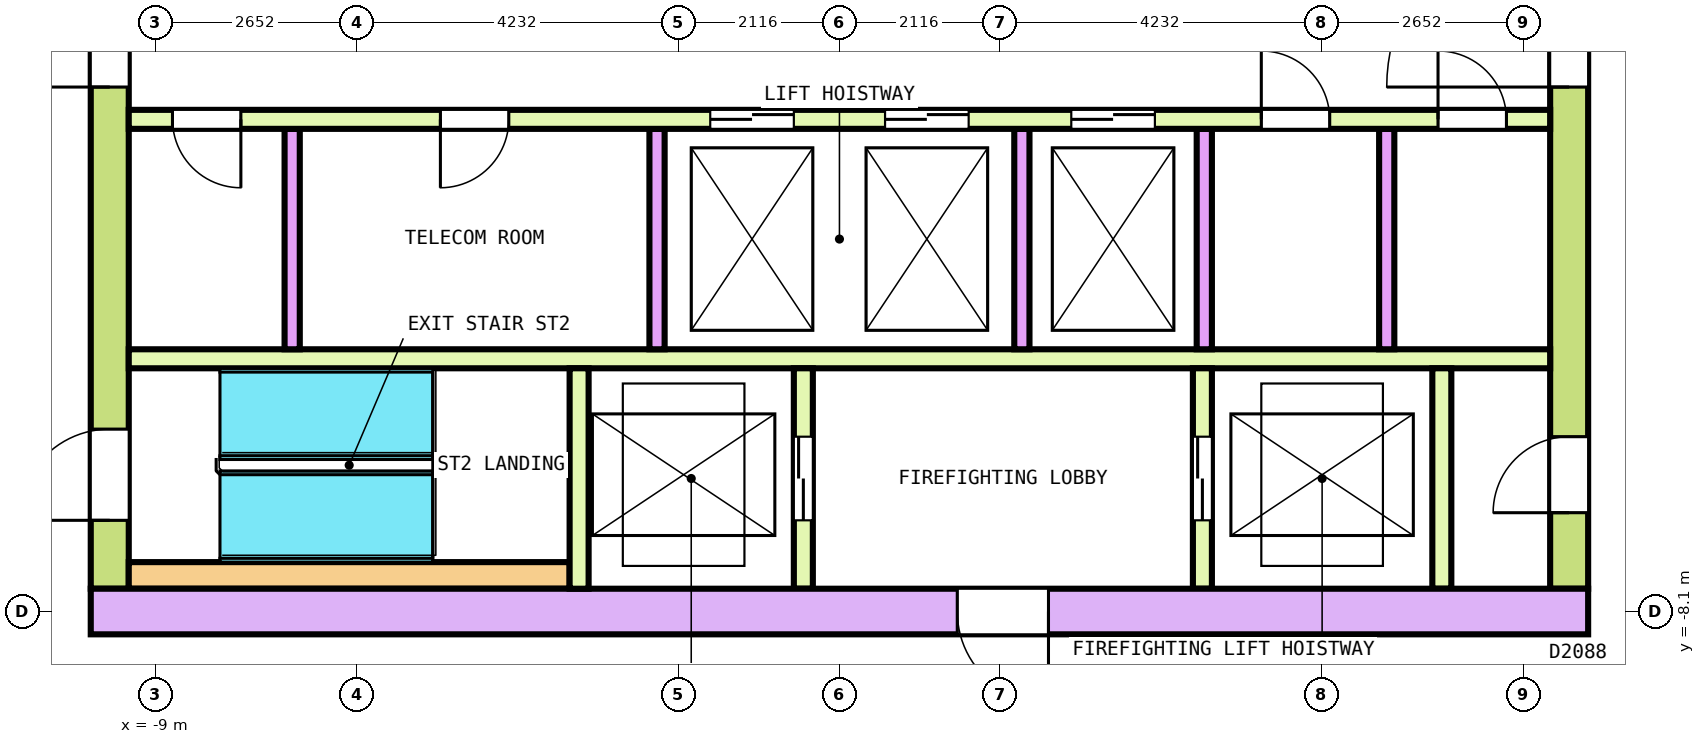
"""IFC4 building model, lengths in metres.
Left out: names, types, materials, properties, quantities, classifications, styles, units other than length and angle.
Written with IfcOpenShell. Run it as: python <this file> out.ifc"""

import sys

from ifc_helpers import new_model, si_unit, direction, frame, frame_2d, origin, place, context, subcontext, project, spatial, rectangle, extrude, element, fill, save


model = new_model("IFC4")
c1 = context("Model", 3, precision=1e-05, world=origin(), true_north=direction((0.0, 1.0)))
c2 = subcontext(c1, "Body", "Model", "MODEL_VIEW")
j1 = project(units=[si_unit("LENGTHUNIT", "METRE"), si_unit("PLANEANGLEUNIT", "RADIAN")], contexts=[c1])
p1 = place(None, origin())
s1 = spatial("IfcSite", under=j1, at=p1, CompositionType="ELEMENT")
p2 = place(p1, origin())
s2 = spatial("IfcBuilding", under=s1, at=p2, CompositionType="ELEMENT")
p3 = place(p2, frame((0.0, 0.0, 253.4)))
s3 = spatial("IfcBuildingStorey", under=s2, at=p3, CompositionType="ELEMENT", Elevation=253.4)
p4 = place(p3, frame((-9.85, -8.1, 0.0), z_axis=(0.0, 0.0, 1.0), x_axis=(1.0, 0.0, 0.0)))
e1 = element("IfcWall", 1, at=p4, inside=s3, PredefinedType="SHEAR", context=c2, shape_type="SweptSolid", body=[
    extrude(rectangle(XDim=19.7, YDim=0.6, at=frame_2d((9.85, 0.0))), origin(), (0.0, 0.0, 1.0), 3.7),
])
p5 = place(p4, frame((11.4, 0.0, 0.0)))
e2 = element("IfcOpeningElement", 2, at=p5, cuts=e1, PredefinedType="OPENING", context=c2, shape_type="SweptSolid", body=[
    extrude(rectangle(XDim=1.2, YDim=2.1, at=frame_2d((0.6, 1.05))), frame((0.0, 0.31, 0.0), z_axis=(0.0, -1.0, 0.0), x_axis=(1.0, 0.0, 0.0)), (0.0, 0.0, 1.0), 0.62),
])
p6 = place(p3, frame((-9.6, -7.8, 0.0), z_axis=(0.0, 0.0, 1.0), x_axis=(0.0, 1.0, 0.0)))
e3 = element("IfcWall", 3, at=p6, inside=s3, PredefinedType="SHEAR", context=c2, shape_type="SweptSolid", body=[
    extrude(rectangle(XDim=15.6, YDim=0.5, at=frame_2d((7.8, 0.0))), origin(), (0.0, 0.0, 1.0), 3.7),
])
p7 = place(p6, frame((6.6, 0.0, 0.0)))
e4 = element("IfcOpeningElement", 4, at=p7, cuts=e3, PredefinedType="OPENING", context=c2, shape_type="SweptSolid", body=[
    extrude(rectangle(XDim=2.4, YDim=2.1, at=frame_2d((1.2, 1.05))), frame((0.0, 0.26, 0.0), z_axis=(0.0, -1.0, 0.0), x_axis=(1.0, 0.0, 0.0)), (0.0, 0.0, 1.0), 0.52),
])
p8 = place(p6, frame((13.5, 0.0, 0.0)))
e5 = element("IfcOpeningElement", 5, at=p8, cuts=e3, PredefinedType="OPENING", context=c2, shape_type="SweptSolid", body=[
    extrude(rectangle(XDim=1.2, YDim=2.1, at=frame_2d((0.6, 1.05))), frame((0.0, 0.26, 0.0), z_axis=(0.0, -1.0, 0.0), x_axis=(1.0, 0.0, 0.0)), (0.0, 0.0, 1.0), 0.52),
])
p9 = place(p6, frame((0.9, 0.0, 0.0)))
e6 = element("IfcOpeningElement", 6, at=p9, cuts=e3, PredefinedType="OPENING", context=c2, shape_type="SweptSolid", body=[
    extrude(rectangle(XDim=1.2, YDim=2.1, at=frame_2d((0.6, 1.05))), frame((0.0, 0.26, 0.0), z_axis=(0.0, -1.0, 0.0), x_axis=(1.0, 0.0, 0.0)), (0.0, 0.0, 1.0), 0.52),
])
p10 = place(p3, frame((9.6, -7.8, 0.0), z_axis=(0.0, 0.0, 1.0), x_axis=(0.0, 1.0, 0.0)))
e7 = element("IfcWall", 7, at=p10, inside=s3, PredefinedType="SHEAR", context=c2, shape_type="SweptSolid", body=[
    extrude(rectangle(XDim=15.6, YDim=0.5, at=frame_2d((7.8, 0.0))), origin(), (0.0, 0.0, 1.0), 3.7),
])
p11 = place(p10, frame((6.6, 0.0, 0.0)))
e8 = element("IfcOpeningElement", 8, at=p11, cuts=e7, PredefinedType="OPENING", context=c2, shape_type="SweptSolid", body=[
    extrude(rectangle(XDim=2.4, YDim=2.1, at=frame_2d((1.2, 1.05))), frame((0.0, 0.26, 0.0), z_axis=(0.0, -1.0, 0.0), x_axis=(1.0, 0.0, 0.0)), (0.0, 0.0, 1.0), 0.52),
])
p12 = place(p10, frame((13.5, 0.0, 0.0)))
e9 = element("IfcOpeningElement", 9, at=p12, cuts=e7, PredefinedType="OPENING", context=c2, shape_type="SweptSolid", body=[
    extrude(rectangle(XDim=1.2, YDim=2.1, at=frame_2d((0.6, 1.05))), frame((0.0, 0.26, 0.0), z_axis=(0.0, -1.0, 0.0), x_axis=(1.0, 0.0, 0.0)), (0.0, 0.0, 1.0), 0.52),
])
p13 = place(p10, frame((1.0, 0.0, 0.0)))
e10 = element("IfcOpeningElement", 10, at=p13, cuts=e7, PredefinedType="OPENING", context=c2, shape_type="SweptSolid", body=[
    extrude(rectangle(XDim=1.0, YDim=2.1, at=frame_2d((0.5, 1.05))), frame((0.0, 0.26, 0.0), z_axis=(0.0, -1.0, 0.0), x_axis=(1.0, 0.0, 0.0)), (0.0, 0.0, 1.0), 0.52),
])
p14 = place(p3, frame((-9.35, -1.625, 0.0), z_axis=(0.0, 0.0, 1.0), x_axis=(1.0, 0.0, 0.0)))
e11 = element("IfcWall", 11, at=p14, inside=s3, PredefinedType="SOLIDWALL", context=c2, shape_type="SweptSolid", body=[
    extrude(rectangle(XDim=18.7, YDim=0.25, at=frame_2d((9.35, 0.0))), origin(), (0.0, 0.0, 1.0), 3.7),
])
p15 = place(p14, frame((7.65, 0.0, 0.0)))
e12 = element("IfcOpeningElement", 12, at=p15, cuts=e11, PredefinedType="OPENING", context=c2, shape_type="SweptSolid", body=[
    extrude(rectangle(XDim=1.1, YDim=2.1, at=frame_2d((0.55, 1.05))), frame((0.0, 0.135, 0.0), z_axis=(0.0, -1.0, 0.0), x_axis=(1.0, 0.0, 0.0)), (0.0, 0.0, 1.0), 0.27),
])
p16 = place(p14, frame((9.95, 0.0, 0.0)))
e13 = element("IfcOpeningElement", 13, at=p16, cuts=e11, PredefinedType="OPENING", context=c2, shape_type="SweptSolid", body=[
    extrude(rectangle(XDim=1.1, YDim=2.1, at=frame_2d((0.55, 1.05))), frame((0.0, 0.135, 0.0), z_axis=(0.0, -1.0, 0.0), x_axis=(1.0, 0.0, 0.0)), (0.0, 0.0, 1.0), 0.27),
])
p17 = place(p14, frame((12.4, 0.0, 0.0)))
e14 = element("IfcOpeningElement", 14, at=p17, cuts=e11, PredefinedType="OPENING", context=c2, shape_type="SweptSolid", body=[
    extrude(rectangle(XDim=1.1, YDim=2.1, at=frame_2d((0.55, 1.05))), frame((0.0, 0.135, 0.0), z_axis=(0.0, -1.0, 0.0), x_axis=(1.0, 0.0, 0.0)), (0.0, 0.0, 1.0), 0.27),
])
p18 = place(p14, frame((0.575, 0.0, 0.0)))
e15 = element("IfcOpeningElement", 15, at=p18, cuts=e11, PredefinedType="OPENING", context=c2, shape_type="SweptSolid", body=[
    extrude(rectangle(XDim=0.9, YDim=2.1, at=frame_2d((0.45, 1.05))), frame((0.0, 0.135, 0.0), z_axis=(0.0, -1.0, 0.0), x_axis=(1.0, 0.0, 0.0)), (0.0, 0.0, 1.0), 0.27),
])
p19 = place(p14, frame((4.1, 0.0, 0.0)))
e16 = element("IfcOpeningElement", 16, at=p19, cuts=e11, PredefinedType="OPENING", context=c2, shape_type="SweptSolid", body=[
    extrude(rectangle(XDim=0.9, YDim=2.1, at=frame_2d((0.45, 1.05))), frame((0.0, 0.135, 0.0), z_axis=(0.0, -1.0, 0.0), x_axis=(1.0, 0.0, 0.0)), (0.0, 0.0, 1.0), 0.27),
])
p20 = place(p14, frame((14.9, 0.0, 0.0)))
e17 = element("IfcOpeningElement", 17, at=p20, cuts=e11, PredefinedType="OPENING", context=c2, shape_type="SweptSolid", body=[
    extrude(rectangle(XDim=0.9, YDim=2.1, at=frame_2d((0.45, 1.05))), frame((0.0, 0.135, 0.0), z_axis=(0.0, -1.0, 0.0), x_axis=(1.0, 0.0, 0.0)), (0.0, 0.0, 1.0), 0.27),
])
p21 = place(p14, frame((17.225, 0.0, 0.0)))
e18 = element("IfcOpeningElement", 18, at=p21, cuts=e11, PredefinedType="OPENING", context=c2, shape_type="SweptSolid", body=[
    extrude(rectangle(XDim=0.9, YDim=2.1, at=frame_2d((0.45, 1.05))), frame((0.0, 0.135, 0.0), z_axis=(0.0, -1.0, 0.0), x_axis=(1.0, 0.0, 0.0)), (0.0, 0.0, 1.0), 0.27),
])
p22 = place(p3, frame((-9.35, -4.775, 0.0), z_axis=(0.0, 0.0, 1.0), x_axis=(1.0, 0.0, 0.0)))
e19 = element("IfcWall", 19, at=p22, inside=s3, PredefinedType="SOLIDWALL", context=c2, shape_type="SweptSolid", body=[
    extrude(rectangle(XDim=18.7, YDim=0.25, at=frame_2d((9.35, 0.0))), origin(), (0.0, 0.0, 1.0), 3.7),
])
for number, where, z_axis, x_axis in (
    (20, (-7.2, -4.65, 0.0), (0.0, 0.0, 1.0), (0.0, 1.0, 0.0)),
    (21, (-2.4, -4.65, 0.0), (0.0, 0.0, 1.0), (0.0, 1.0, 0.0)),
    (22, (2.4, -4.65, 0.0), (0.0, 0.0, 1.0), (0.0, 1.0, 0.0)),
    (23, (4.8, -4.65, 0.0), (0.0, 0.0, 1.0), (0.0, 1.0, 0.0)),
    (24, (7.2, -4.65, 0.0), (0.0, 0.0, 1.0), (0.0, 1.0, 0.0)),
):
    element("IfcWall", number, at=place(p3, frame(where, z_axis=z_axis, x_axis=x_axis)), inside=s3, PredefinedType="SOLIDWALL", context=c2, shape_type="SweptSolid", body=[
        extrude(rectangle(XDim=2.9, YDim=0.2, at=frame_2d((1.45, 0.0))), origin(), (0.0, 0.0, 1.0), 3.7),
    ])
p23 = place(p3, frame((-9.35, -7.625, 0.0), z_axis=(0.0, 0.0, 1.0), x_axis=(1.0, 0.0, 0.0)))
e25 = element("IfcWall", 25, at=p23, inside=s3, PredefinedType="SOLIDWALL", context=c2, shape_type="SweptSolid", body=[
    extrude(rectangle(XDim=5.8, YDim=0.35, at=frame_2d((2.9, 0.0))), origin(), (0.0, 0.0, 1.0), 3.7),
])
p24 = place(p3, frame((-3.425, -7.8, 0.0), z_axis=(0.0, 0.0, 1.0), x_axis=(0.0, 1.0, 0.0)))
e26 = element("IfcWall", 26, at=p24, inside=s3, PredefinedType="SOLIDWALL", context=c2, shape_type="SweptSolid", body=[
    extrude(rectangle(XDim=2.9, YDim=0.25, at=frame_2d((1.45, 0.0))), origin(), (0.0, 0.0, 1.0), 3.7),
])
p25 = place(p3, frame((-0.475, -7.8, 0.0), z_axis=(0.0, 0.0, 1.0), x_axis=(0.0, 1.0, 0.0)))
e27 = element("IfcWall", 27, at=p25, inside=s3, PredefinedType="SOLIDWALL", context=c2, shape_type="SweptSolid", body=[
    extrude(rectangle(XDim=2.9, YDim=0.25, at=frame_2d((1.45, 0.0))), origin(), (0.0, 0.0, 1.0), 3.7),
])
p26 = place(p25, frame((0.9, 0.0, 0.0)))
e28 = element("IfcOpeningElement", 28, at=p26, cuts=e27, PredefinedType="OPENING", context=c2, shape_type="SweptSolid", body=[
    extrude(rectangle(XDim=1.1, YDim=2.1, at=frame_2d((0.55, 1.05))), frame((0.0, 0.135, 0.0), z_axis=(0.0, -1.0, 0.0), x_axis=(1.0, 0.0, 0.0)), (0.0, 0.0, 1.0), 0.27),
])
p27 = place(p3, frame((4.775, -7.8, 0.0), z_axis=(0.0, 0.0, 1.0), x_axis=(0.0, 1.0, 0.0)))
e29 = element("IfcWall", 29, at=p27, inside=s3, PredefinedType="SOLIDWALL", context=c2, shape_type="SweptSolid", body=[
    extrude(rectangle(XDim=2.9, YDim=0.25, at=frame_2d((1.45, 0.0))), origin(), (0.0, 0.0, 1.0), 3.7),
])
p28 = place(p27, frame((0.9, 0.0, 0.0)))
e30 = element("IfcOpeningElement", 30, at=p28, cuts=e29, PredefinedType="OPENING", context=c2, shape_type="SweptSolid", body=[
    extrude(rectangle(XDim=1.1, YDim=2.1, at=frame_2d((0.55, 1.05))), frame((0.0, 0.135, 0.0), z_axis=(0.0, -1.0, 0.0), x_axis=(1.0, 0.0, 0.0)), (0.0, 0.0, 1.0), 0.27),
])
p29 = place(p3, frame((7.925, -7.8, 0.0), z_axis=(0.0, 0.0, 1.0), x_axis=(0.0, 1.0, 0.0)))
e31 = element("IfcWall", 31, at=p29, inside=s3, PredefinedType="SOLIDWALL", context=c2, shape_type="SweptSolid", body=[
    extrude(rectangle(XDim=2.9, YDim=0.25, at=frame_2d((1.45, 0.0))), origin(), (0.0, 0.0, 1.0), 3.7),
])
p30 = place(p15, origin())
e32 = element("IfcDoor", 32, at=p30, inside=s3, OperationType="DOUBLE_DOOR_SLIDING", PredefinedType="DOOR", context=c2, shape_type="SweptSolid", body=[
    extrude(rectangle(XDim=1.1, YDim=2.1, at=frame_2d((0.55, 1.05))), frame((0.0, 0.075, 0.0), z_axis=(0.0, -1.0, 0.0), x_axis=(1.0, 0.0, 0.0)), (0.0, 0.0, 1.0), 0.15),
])
fill(e12, e32)
p31 = place(p16, origin())
e33 = element("IfcDoor", 33, at=p31, inside=s3, OperationType="DOUBLE_DOOR_SLIDING", PredefinedType="DOOR", context=c2, shape_type="SweptSolid", body=[
    extrude(rectangle(XDim=1.1, YDim=2.1, at=frame_2d((0.55, 1.05))), frame((0.0, 0.075, 0.0), z_axis=(0.0, -1.0, 0.0), x_axis=(1.0, 0.0, 0.0)), (0.0, 0.0, 1.0), 0.15),
])
fill(e13, e33)
p32 = place(p17, origin())
e34 = element("IfcDoor", 34, at=p32, inside=s3, OperationType="DOUBLE_DOOR_SLIDING", PredefinedType="DOOR", context=c2, shape_type="SweptSolid", body=[
    extrude(rectangle(XDim=1.1, YDim=2.1, at=frame_2d((0.55, 1.05))), frame((0.0, 0.075, 0.0), z_axis=(0.0, -1.0, 0.0), x_axis=(1.0, 0.0, 0.0)), (0.0, 0.0, 1.0), 0.15),
])
fill(e14, e34)
p33 = place(p26, origin())
e35 = element("IfcDoor", 35, at=p33, inside=s3, OperationType="DOUBLE_DOOR_SLIDING", PredefinedType="DOOR", context=c2, shape_type="SweptSolid", body=[
    extrude(rectangle(XDim=1.1, YDim=2.1, at=frame_2d((0.55, 1.05))), frame((0.0, 0.075, 0.0), z_axis=(0.0, -1.0, 0.0), x_axis=(1.0, 0.0, 0.0)), (0.0, 0.0, 1.0), 0.15),
])
fill(e28, e35)
p34 = place(p28, origin())
e36 = element("IfcDoor", 36, at=p34, inside=s3, OperationType="DOUBLE_DOOR_SLIDING", PredefinedType="DOOR", context=c2, shape_type="SweptSolid", body=[
    extrude(rectangle(XDim=1.1, YDim=2.1, at=frame_2d((0.55, 1.05))), frame((0.0, 0.075, 0.0), z_axis=(0.0, -1.0, 0.0), x_axis=(1.0, 0.0, 0.0)), (0.0, 0.0, 1.0), 0.15),
])
fill(e30, e36)
p35 = place(p7, origin())
e37 = element("IfcDoor", 37, at=p35, inside=s3, OperationType="DOUBLE_DOOR_SINGLE_SWING", PredefinedType="DOOR", context=c2, shape_type="SweptSolid", body=[
    extrude(rectangle(XDim=2.4, YDim=2.1, at=frame_2d((1.2, 1.05))), frame((0.0, 0.2, 0.0), z_axis=(0.0, -1.0, 0.0), x_axis=(1.0, 0.0, 0.0)), (0.0, 0.0, 1.0), 0.4),
])
fill(e4, e37)
p36 = place(p11, origin())
e38 = element("IfcDoor", 38, at=p36, inside=s3, OperationType="DOUBLE_DOOR_SINGLE_SWING", PredefinedType="DOOR", context=c2, shape_type="SweptSolid", body=[
    extrude(rectangle(XDim=2.4, YDim=2.1, at=frame_2d((1.2, 1.05))), frame((0.0, 0.2, 0.0), z_axis=(0.0, -1.0, 0.0), x_axis=(1.0, 0.0, 0.0)), (0.0, 0.0, 1.0), 0.4),
])
fill(e8, e38)
p37 = place(p9, origin())
e39 = element("IfcDoor", 39, at=p37, inside=s3, OperationType="SINGLE_SWING_LEFT", PredefinedType="DOOR", context=c2, shape_type="SweptSolid", body=[
    extrude(rectangle(XDim=1.2, YDim=2.1, at=frame_2d((0.6, 1.05))), frame((0.0, 0.2, 0.0), z_axis=(0.0, -1.0, 0.0), x_axis=(1.0, 0.0, 0.0)), (0.0, 0.0, 1.0), 0.4),
])
fill(e6, e39)
p38 = place(p5, origin())
e40 = element("IfcDoor", 40, at=p38, inside=s3, OperationType="SINGLE_SWING_LEFT", PredefinedType="DOOR", context=c2, shape_type="SweptSolid", body=[
    extrude(rectangle(XDim=1.2, YDim=2.1, at=frame_2d((0.6, 1.05))), frame((0.0, 0.25, 0.0), z_axis=(0.0, -1.0, 0.0), x_axis=(1.0, 0.0, 0.0)), (0.0, 0.0, 1.0), 0.5),
])
fill(e2, e40)
p39 = place(p13, origin())
e41 = element("IfcDoor", 41, at=p39, inside=s3, OperationType="SINGLE_SWING_LEFT", PredefinedType="DOOR", context=c2, shape_type="SweptSolid", body=[
    extrude(rectangle(XDim=1.0, YDim=2.1, at=frame_2d((0.5, 1.05))), frame((0.0, 0.2, 0.0), z_axis=(0.0, -1.0, 0.0), x_axis=(1.0, 0.0, 0.0)), (0.0, 0.0, 1.0), 0.4),
])
fill(e10, e41)
p40 = place(p18, origin())
e42 = element("IfcDoor", 42, at=p40, inside=s3, OperationType="SINGLE_SWING_RIGHT", PredefinedType="DOOR", context=c2, shape_type="SweptSolid", body=[
    extrude(rectangle(XDim=0.9, YDim=2.1, at=frame_2d((0.45, 1.05))), frame((0.0, 0.075, 0.0), z_axis=(0.0, -1.0, 0.0), x_axis=(1.0, 0.0, 0.0)), (0.0, 0.0, 1.0), 0.15),
])
fill(e15, e42)
p41 = place(p19, origin())
e43 = element("IfcDoor", 43, at=p41, inside=s3, OperationType="SINGLE_SWING_LEFT", PredefinedType="DOOR", context=c2, shape_type="SweptSolid", body=[
    extrude(rectangle(XDim=0.9, YDim=2.1, at=frame_2d((0.45, 1.05))), frame((0.0, 0.075, 0.0), z_axis=(0.0, -1.0, 0.0), x_axis=(1.0, 0.0, 0.0)), (0.0, 0.0, 1.0), 0.15),
])
fill(e16, e43)
p42 = place(p20, origin())
e44 = element("IfcDoor", 44, at=p42, inside=s3, OperationType="SINGLE_SWING_RIGHT", PredefinedType="DOOR", context=c2, shape_type="SweptSolid", body=[
    extrude(rectangle(XDim=0.9, YDim=2.1, at=frame_2d((0.45, 1.05))), frame((0.0, 0.075, 0.0), z_axis=(0.0, -1.0, 0.0), x_axis=(1.0, 0.0, 0.0)), (0.0, 0.0, 1.0), 0.15),
])
fill(e17, e44)
p43 = place(p21, origin())
e45 = element("IfcDoor", 45, at=p43, inside=s3, OperationType="SINGLE_SWING_LEFT", PredefinedType="DOOR", context=c2, shape_type="SweptSolid", body=[
    extrude(rectangle(XDim=0.9, YDim=2.1, at=frame_2d((0.45, 1.05))), frame((0.0, 0.075, 0.0), z_axis=(0.0, -1.0, 0.0), x_axis=(1.0, 0.0, 0.0)), (0.0, 0.0, 1.0), 0.15),
])
fill(e18, e45)
save(model, sys.argv[1])
